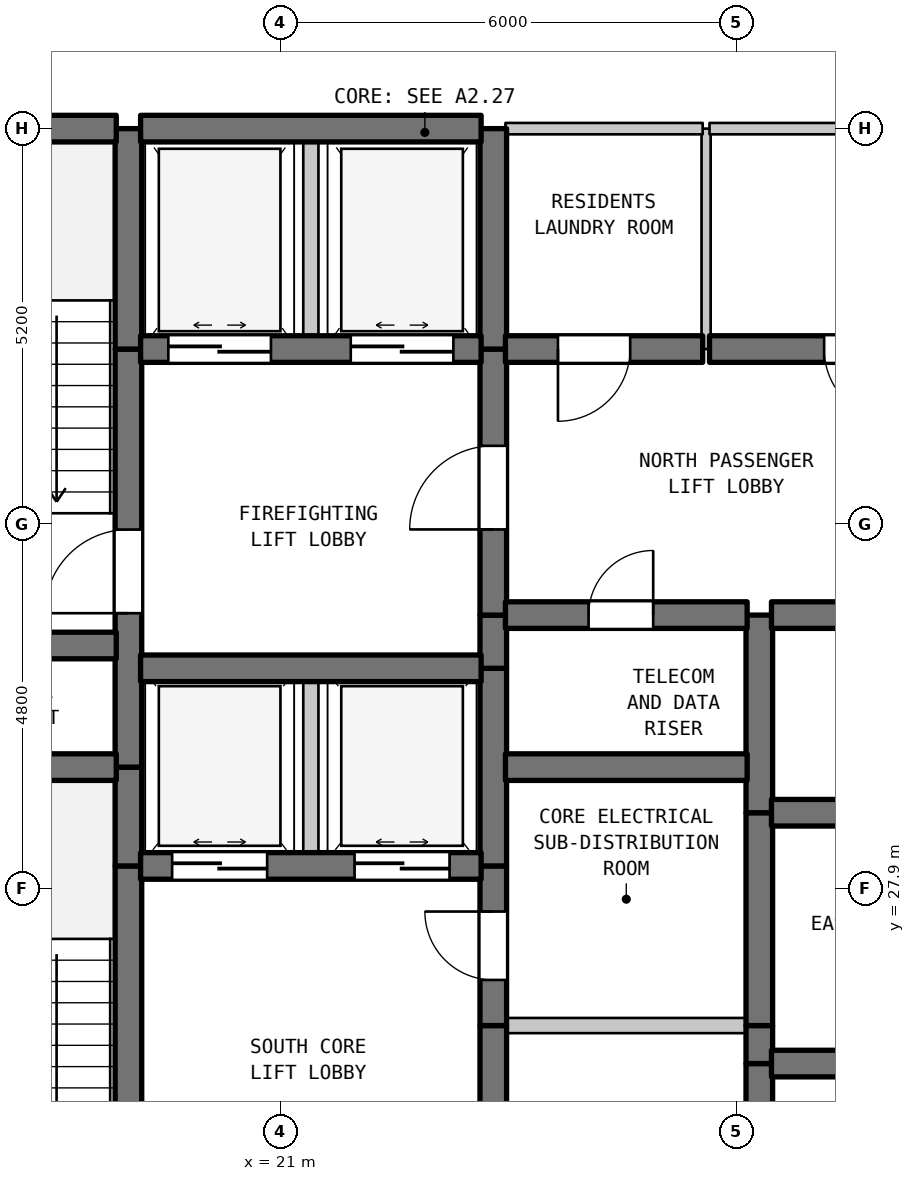
"""IFC4 building model, lengths in metres.
Left out: names, types, materials, properties, quantities, classifications, styles, units other than length and angle.
Written with IfcOpenShell. Run it as: python <this file> out.ifc"""

import sys

from ifc_helpers import new_model, si_unit, direction, frame, frame_2d, origin, place, context, subcontext, project, spatial, rectangle, extrude, element, fill, save


model = new_model("IFC4")
c1 = context("Model", 3, precision=1e-05, world=origin(), true_north=direction((0.0, 1.0)))
c2 = subcontext(c1, "Body", "Model", "MODEL_VIEW")
j1 = project(units=[si_unit("LENGTHUNIT", "METRE"), si_unit("PLANEANGLEUNIT", "RADIAN")], contexts=[c1])
p1 = place(None, origin())
s1 = spatial("IfcSite", under=j1, at=p1, CompositionType="ELEMENT")
p2 = place(p1, origin())
s2 = spatial("IfcBuilding", under=s1, at=p2, CompositionType="ELEMENT")
p3 = place(p2, frame((0.0, 0.0, 254.7)))
s3 = spatial("IfcBuildingStorey", under=s2, at=p3, CompositionType="ELEMENT", Elevation=254.7)
p4 = place(p3, frame((19.0, 22.7, 0.0), z_axis=(0.0, 0.0, 1.0), x_axis=(0.0, 1.0, 0.0)))
e1 = element("IfcWall", 1, at=p4, inside=s3, PredefinedType="SHEAR", context=c2, shape_type="SweptSolid", body=[
    extrude(rectangle(XDim=5.5, YDim=0.35, at=frame_2d((2.75, 0.0))), origin(), (0.0, 0.0, 1.0), 3.39),
])
p5 = place(p4, frame((0.631, 0.0, 0.0)))
e2 = element("IfcOpeningElement", 2, at=p5, cuts=e1, PredefinedType="OPENING", context=c2, shape_type="SweptSolid", body=[
    extrude(rectangle(XDim=1.1, YDim=2.15, at=frame_2d((0.55, 1.075))), frame((0.0, 0.185, 0.0), z_axis=(0.0, -1.0, 0.0), x_axis=(1.0, 0.0, 0.0)), (0.0, 0.0, 1.0), 0.37),
])
p6 = place(p3, frame((19.0, 28.2, 0.0), z_axis=(0.0, 0.0, 1.0), x_axis=(0.0, 1.0, 0.0)))
e3 = element("IfcWall", 3, at=p6, inside=s3, PredefinedType="SHEAR", context=c2, shape_type="SweptSolid", body=[
    extrude(rectangle(XDim=1.3, YDim=0.35, at=frame_2d((0.65, 0.0))), origin(), (0.0, 0.0, 1.0), 3.39),
])
p7 = place(p3, frame((19.0, 29.5, 0.0), z_axis=(0.0, 0.0, 1.0), x_axis=(0.0, 1.0, 0.0)))
e4 = element("IfcWall", 4, at=p7, inside=s3, PredefinedType="SHEAR", context=c2, shape_type="SweptSolid", body=[
    extrude(rectangle(XDim=5.5, YDim=0.35, at=frame_2d((2.75, 0.0))), origin(), (0.0, 0.0, 1.0), 3.39),
])
p8 = place(p7, frame((2.025, 0.0, 0.0)))
e5 = element("IfcOpeningElement", 5, at=p8, cuts=e4, PredefinedType="OPENING", context=c2, shape_type="SweptSolid", body=[
    extrude(rectangle(XDim=1.1, YDim=2.15, at=frame_2d((0.55, 1.075))), frame((0.0, 0.185, 0.0), z_axis=(0.0, -1.0, 0.0), x_axis=(1.0, 0.0, 0.0)), (0.0, 0.0, 1.0), 0.37),
])
p9 = place(p3, frame((19.0, 35.0, 0.0), z_axis=(0.0, 0.0, 1.0), x_axis=(0.0, 1.0, 0.0)))
e6 = element("IfcWall", 6, at=p9, inside=s3, PredefinedType="SHEAR", context=c2, shape_type="SweptSolid", body=[
    extrude(rectangle(XDim=2.9, YDim=0.35, at=frame_2d((1.45, 0.0))), origin(), (0.0, 0.0, 1.0), 3.39),
])
p10 = place(p3, frame((21.4, 28.2, 0.0), z_axis=(0.0, 0.0, 1.0), x_axis=(0.0, 1.0, 0.0)))
e7 = element("IfcWall", 7, at=p10, inside=s3, PredefinedType="STANDARD", context=c2, shape_type="SweptSolid", body=[
    extrude(rectangle(XDim=2.6, YDim=0.2, at=frame_2d((1.3, 0.0))), origin(), (0.0, 0.0, 1.0), 3.39),
])
p11 = place(p3, frame((21.4, 35.0, 0.0), z_axis=(0.0, 0.0, 1.0), x_axis=(0.0, 1.0, 0.0)))
e8 = element("IfcWall", 8, at=p11, inside=s3, PredefinedType="STANDARD", context=c2, shape_type="SweptSolid", body=[
    extrude(rectangle(XDim=2.9, YDim=0.2, at=frame_2d((1.45, 0.0))), origin(), (0.0, 0.0, 1.0), 3.39),
])
p12 = place(p3, frame((23.8, 19.5, 0.0), z_axis=(0.0, 0.0, 1.0), x_axis=(0.0, 1.0, 0.0)))
e9 = element("IfcWall", 9, at=p12, inside=s3, PredefinedType="SHEAR", context=c2, shape_type="SweptSolid", body=[
    extrude(rectangle(XDim=6.6, YDim=0.35, at=frame_2d((3.3, 0.0))), origin(), (0.0, 0.0, 1.0), 3.39),
])
p13 = place(p12, frame((4.304, 0.0, 0.0)))
e10 = element("IfcOpeningElement", 10, at=p13, cuts=e9, PredefinedType="OPENING", context=c2, shape_type="SweptSolid", body=[
    extrude(rectangle(XDim=0.9, YDim=2.15, at=frame_2d((0.45, 1.075))), frame((0.0, 0.185, 0.0), z_axis=(0.0, -1.0, 0.0), x_axis=(1.0, 0.0, 0.0)), (0.0, 0.0, 1.0), 0.37),
])
p14 = place(p3, frame((23.8, 26.1, 0.0), z_axis=(0.0, 0.0, 1.0), x_axis=(0.0, 1.0, 0.0)))
e11 = element("IfcWall", 11, at=p14, inside=s3, PredefinedType="SHEAR", context=c2, shape_type="SweptSolid", body=[
    extrude(rectangle(XDim=2.1, YDim=0.35, at=frame_2d((1.05, 0.0))), origin(), (0.0, 0.0, 1.0), 3.39),
])
p15 = place(p14, frame((0.6, 0.0, 0.0)))
e12 = element("IfcOpeningElement", 12, at=p15, cuts=e11, PredefinedType="OPENING", context=c2, shape_type="SweptSolid", body=[
    extrude(rectangle(XDim=0.9, YDim=2.15, at=frame_2d((0.45, 1.075))), frame((0.0, 0.185, 0.0), z_axis=(0.0, -1.0, 0.0), x_axis=(1.0, 0.0, 0.0)), (0.0, 0.0, 1.0), 0.37),
])
p16 = place(p3, frame((23.8, 28.2, 0.0), z_axis=(0.0, 0.0, 1.0), x_axis=(0.0, 1.0, 0.0)))
e13 = element("IfcWall", 13, at=p16, inside=s3, PredefinedType="SHEAR", context=c2, shape_type="SweptSolid", body=[
    extrude(rectangle(XDim=2.6, YDim=0.35, at=frame_2d((1.3, 0.0))), origin(), (0.0, 0.0, 1.0), 3.39),
])
p17 = place(p3, frame((23.8, 30.8, 0.0), z_axis=(0.0, 0.0, 1.0), x_axis=(0.0, 1.0, 0.0)))
e14 = element("IfcWall", 14, at=p17, inside=s3, PredefinedType="SHEAR", context=c2, shape_type="SweptSolid", body=[
    extrude(rectangle(XDim=0.7, YDim=0.35, at=frame_2d((0.35, 0.0))), origin(), (0.0, 0.0, 1.0), 3.39),
])
p18 = place(p3, frame((23.8, 31.5, 0.0), z_axis=(0.0, 0.0, 1.0), x_axis=(0.0, 1.0, 0.0)))
e15 = element("IfcWall", 15, at=p18, inside=s3, PredefinedType="SHEAR", context=c2, shape_type="SweptSolid", body=[
    extrude(rectangle(XDim=3.5, YDim=0.35, at=frame_2d((1.75, 0.0))), origin(), (0.0, 0.0, 1.0), 3.39),
])
p19 = place(p18, frame((1.127, 0.0, 0.0)))
e16 = element("IfcOpeningElement", 16, at=p19, cuts=e15, PredefinedType="OPENING", context=c2, shape_type="SweptSolid", body=[
    extrude(rectangle(XDim=1.1, YDim=2.15, at=frame_2d((0.55, 1.075))), frame((0.0, 0.185, 0.0), z_axis=(0.0, -1.0, 0.0), x_axis=(1.0, 0.0, 0.0)), (0.0, 0.0, 1.0), 0.37),
])
p20 = place(p3, frame((23.8, 35.0, 0.0), z_axis=(0.0, 0.0, 1.0), x_axis=(0.0, 1.0, 0.0)))
e17 = element("IfcWall", 17, at=p20, inside=s3, PredefinedType="SHEAR", context=c2, shape_type="SweptSolid", body=[
    extrude(rectangle(XDim=2.9, YDim=0.35, at=frame_2d((1.45, 0.0))), origin(), (0.0, 0.0, 1.0), 3.39),
])
p21 = place(p3, frame((26.6, 35.0, 0.0), z_axis=(0.0, 0.0, 1.0), x_axis=(0.0, 1.0, 0.0)))
e18 = element("IfcWall", 18, at=p21, inside=s3, PredefinedType="PARTITIONING", context=c2, shape_type="SweptSolid", body=[
    extrude(rectangle(XDim=2.9, YDim=0.12, at=frame_2d((1.45, 0.0))), origin(), (0.0, 0.0, 1.0), 3.39),
])
p22 = place(p3, frame((27.3, 22.7, 0.0), z_axis=(0.0, 0.0, 1.0), x_axis=(0.0, 1.0, 0.0)))
e19 = element("IfcWall", 19, at=p22, inside=s3, PredefinedType="SHEAR", context=c2, shape_type="SweptSolid", body=[
    extrude(rectangle(XDim=2.9, YDim=0.35, at=frame_2d((1.45, 0.0))), origin(), (0.0, 0.0, 1.0), 3.39),
])
p23 = place(p3, frame((27.3, 25.6, 0.0), z_axis=(0.0, 0.0, 1.0), x_axis=(0.0, 1.0, 0.0)))
e20 = element("IfcWall", 20, at=p23, inside=s3, PredefinedType="SHEAR", context=c2, shape_type="SweptSolid", body=[
    extrude(rectangle(XDim=0.5, YDim=0.35, at=frame_2d((0.25, 0.0))), origin(), (0.0, 0.0, 1.0), 3.39),
])
p24 = place(p3, frame((27.3, 26.1, 0.0), z_axis=(0.0, 0.0, 1.0), x_axis=(0.0, 1.0, 0.0)))
e21 = element("IfcWall", 21, at=p24, inside=s3, PredefinedType="SHEAR", context=c2, shape_type="SweptSolid", body=[
    extrude(rectangle(XDim=2.8, YDim=0.35, at=frame_2d((1.4, 0.0))), origin(), (0.0, 0.0, 1.0), 3.39),
])
p25 = place(p3, frame((27.3, 28.9, 0.0), z_axis=(0.0, 0.0, 1.0), x_axis=(0.0, 1.0, 0.0)))
e22 = element("IfcWall", 22, at=p25, inside=s3, PredefinedType="SHEAR", context=c2, shape_type="SweptSolid", body=[
    extrude(rectangle(XDim=2.6, YDim=0.35, at=frame_2d((1.3, 0.0))), origin(), (0.0, 0.0, 1.0), 3.39),
])
p26 = place(p3, frame((27.46, 25.6, 0.0), z_axis=(0.0, 0.0, 1.0), x_axis=(1.0, 0.0, 0.0)))
e23 = element("IfcWall", 23, at=p26, inside=s3, PredefinedType="SHEAR", context=c2, shape_type="SweptSolid", body=[
    extrude(rectangle(XDim=3.18, YDim=0.35, at=frame_2d((1.59, 0.0))), origin(), (0.0, 0.0, 1.0), 3.39),
])
p27 = place(p26, frame((1.115, 0.0, 0.0)))
e24 = element("IfcOpeningElement", 24, at=p27, cuts=e23, PredefinedType="OPENING", context=c2, shape_type="SweptSolid", body=[
    extrude(rectangle(XDim=0.95, YDim=2.15, at=frame_2d((0.475, 1.075))), frame((0.0, 0.185, 0.0), z_axis=(0.0, -1.0, 0.0), x_axis=(1.0, 0.0, 0.0)), (0.0, 0.0, 1.0), 0.37),
])
p28 = place(p3, frame((23.96, 26.1, 0.0), z_axis=(0.0, 0.0, 1.0), x_axis=(1.0, 0.0, 0.0)))
e25 = element("IfcWall", 25, at=p28, inside=s3, PredefinedType="STANDARD", context=c2, shape_type="SweptSolid", body=[
    extrude(rectangle(XDim=3.18, YDim=0.2, at=frame_2d((1.59, 0.0))), origin(), (0.0, 0.0, 1.0), 3.39),
])
p29 = place(p3, frame((19.16, 28.2, 0.0), z_axis=(0.0, 0.0, 1.0), x_axis=(1.0, 0.0, 0.0)))
e26 = element("IfcWall", 26, at=p29, inside=s3, PredefinedType="SHEAR", context=c2, shape_type="SweptSolid", body=[
    extrude(rectangle(XDim=4.48, YDim=0.35, at=frame_2d((2.24, 0.0))), origin(), (0.0, 0.0, 1.0), 3.39),
])
p30 = place(p29, frame((0.415, 0.0, 0.0)))
e27 = element("IfcOpeningElement", 27, at=p30, cuts=e26, PredefinedType="OPENING", context=c2, shape_type="SweptSolid", body=[
    extrude(rectangle(XDim=1.25, YDim=2.2, at=frame_2d((0.625, 1.1))), frame((0.0, 0.185, 0.0), z_axis=(0.0, -1.0, 0.0), x_axis=(1.0, 0.0, 0.0)), (0.0, 0.0, 1.0), 0.37),
])
p31 = place(p29, frame((2.815, 0.0, 0.0)))
e28 = element("IfcOpeningElement", 28, at=p31, cuts=e26, PredefinedType="OPENING", context=c2, shape_type="SweptSolid", body=[
    extrude(rectangle(XDim=1.25, YDim=2.2, at=frame_2d((0.625, 1.1))), frame((0.0, 0.185, 0.0), z_axis=(0.0, -1.0, 0.0), x_axis=(1.0, 0.0, 0.0)), (0.0, 0.0, 1.0), 0.37),
])
p32 = place(p3, frame((27.46, 28.9, 0.0), z_axis=(0.0, 0.0, 1.0), x_axis=(1.0, 0.0, 0.0)))
e29 = element("IfcWall", 29, at=p32, inside=s3, PredefinedType="SHEAR", context=c2, shape_type="SweptSolid", body=[
    extrude(rectangle(XDim=3.18, YDim=0.35, at=frame_2d((1.59, 0.0))), origin(), (0.0, 0.0, 1.0), 3.39),
])
p33 = place(p32, frame((1.115, 0.0, 0.0)))
e30 = element("IfcOpeningElement", 30, at=p33, cuts=e29, PredefinedType="OPENING", context=c2, shape_type="SweptSolid", body=[
    extrude(rectangle(XDim=0.95, YDim=2.15, at=frame_2d((0.475, 1.075))), frame((0.0, 0.185, 0.0), z_axis=(0.0, -1.0, 0.0), x_axis=(1.0, 0.0, 0.0)), (0.0, 0.0, 1.0), 0.37),
])
p34 = place(p3, frame((15.16, 29.5, 0.0), z_axis=(0.0, 0.0, 1.0), x_axis=(1.0, 0.0, 0.0)))
e31 = element("IfcWall", 31, at=p34, inside=s3, PredefinedType="SHEAR", context=c2, shape_type="SweptSolid", body=[
    extrude(rectangle(XDim=3.68, YDim=0.35, at=frame_2d((1.84, 0.0))), origin(), (0.0, 0.0, 1.0), 3.39),
])
p35 = place(p3, frame((23.96, 29.5, 0.0), z_axis=(0.0, 0.0, 1.0), x_axis=(1.0, 0.0, 0.0)))
e32 = element("IfcWall", 32, at=p35, inside=s3, PredefinedType="SHEAR", context=c2, shape_type="SweptSolid", body=[
    extrude(rectangle(XDim=3.18, YDim=0.35, at=frame_2d((1.59, 0.0))), origin(), (0.0, 0.0, 1.0), 3.39),
])
p36 = place(p3, frame((19.16, 30.8, 0.0), z_axis=(0.0, 0.0, 1.0), x_axis=(1.0, 0.0, 0.0)))
e33 = element("IfcWall", 33, at=p36, inside=s3, PredefinedType="SHEAR", context=c2, shape_type="SweptSolid", body=[
    extrude(rectangle(XDim=4.48, YDim=0.35, at=frame_2d((2.24, 0.0))), origin(), (0.0, 0.0, 1.0), 3.39),
])
p37 = place(p3, frame((15.16, 31.1, 0.0), z_axis=(0.0, 0.0, 1.0), x_axis=(1.0, 0.0, 0.0)))
e34 = element("IfcWall", 34, at=p37, inside=s3, PredefinedType="SHEAR", context=c2, shape_type="SweptSolid", body=[
    extrude(rectangle(XDim=3.68, YDim=0.35, at=frame_2d((1.84, 0.0))), origin(), (0.0, 0.0, 1.0), 3.39),
])
p38 = place(p3, frame((23.96, 31.5, 0.0), z_axis=(0.0, 0.0, 1.0), x_axis=(1.0, 0.0, 0.0)))
e35 = element("IfcWall", 35, at=p38, inside=s3, PredefinedType="SHEAR", context=c2, shape_type="SweptSolid", body=[
    extrude(rectangle(XDim=3.18, YDim=0.35, at=frame_2d((1.59, 0.0))), origin(), (0.0, 0.0, 1.0), 3.39),
])
p39 = place(p38, frame((1.094, 0.0, 0.0)))
e36 = element("IfcOpeningElement", 36, at=p39, cuts=e35, PredefinedType="OPENING", context=c2, shape_type="SweptSolid", body=[
    extrude(rectangle(XDim=0.85, YDim=2.1, at=frame_2d((0.425, 1.05))), frame((0.0, 0.185, 0.0), z_axis=(0.0, -1.0, 0.0), x_axis=(1.0, 0.0, 0.0)), (0.0, 0.0, 1.0), 0.37),
])
p40 = place(p3, frame((27.46, 31.5, 0.0), z_axis=(0.0, 0.0, 1.0), x_axis=(1.0, 0.0, 0.0)))
e37 = element("IfcWall", 37, at=p40, inside=s3, PredefinedType="SHEAR", context=c2, shape_type="SweptSolid", body=[
    extrude(rectangle(XDim=3.18, YDim=0.35, at=frame_2d((1.59, 0.0))), origin(), (0.0, 0.0, 1.0), 3.39),
])
p41 = place(p3, frame((19.16, 35.0, 0.0), z_axis=(0.0, 0.0, 1.0), x_axis=(1.0, 0.0, 0.0)))
e38 = element("IfcWall", 38, at=p41, inside=s3, PredefinedType="SHEAR", context=c2, shape_type="SweptSolid", body=[
    extrude(rectangle(XDim=4.48, YDim=0.35, at=frame_2d((2.24, 0.0))), origin(), (0.0, 0.0, 1.0), 3.39),
])
p42 = place(p41, frame((0.365, 0.0, 0.0)))
e39 = element("IfcOpeningElement", 39, at=p42, cuts=e38, PredefinedType="OPENING", context=c2, shape_type="SweptSolid", body=[
    extrude(rectangle(XDim=1.35, YDim=2.2, at=frame_2d((0.675, 1.1))), frame((0.0, 0.185, 0.0), z_axis=(0.0, -1.0, 0.0), x_axis=(1.0, 0.0, 0.0)), (0.0, 0.0, 1.0), 0.37),
])
p43 = place(p41, frame((2.765, 0.0, 0.0)))
e40 = element("IfcOpeningElement", 40, at=p43, cuts=e38, PredefinedType="OPENING", context=c2, shape_type="SweptSolid", body=[
    extrude(rectangle(XDim=1.35, YDim=2.2, at=frame_2d((0.675, 1.1))), frame((0.0, 0.185, 0.0), z_axis=(0.0, -1.0, 0.0), x_axis=(1.0, 0.0, 0.0)), (0.0, 0.0, 1.0), 0.37),
])
p44 = place(p3, frame((23.96, 35.0, 0.0), z_axis=(0.0, 0.0, 1.0), x_axis=(1.0, 0.0, 0.0)))
e41 = element("IfcWall", 41, at=p44, inside=s3, PredefinedType="SHEAR", context=c2, shape_type="SweptSolid", body=[
    extrude(rectangle(XDim=2.595, YDim=0.35, at=frame_2d((1.297, 0.0))), origin(), (0.0, 0.0, 1.0), 3.39),
])
p45 = place(p44, frame((0.691, 0.0, 0.0)))
e42 = element("IfcOpeningElement", 42, at=p45, cuts=e41, PredefinedType="OPENING", context=c2, shape_type="SweptSolid", body=[
    extrude(rectangle(XDim=0.95, YDim=2.15, at=frame_2d((0.475, 1.075))), frame((0.0, 0.185, 0.0), z_axis=(0.0, -1.0, 0.0), x_axis=(1.0, 0.0, 0.0)), (0.0, 0.0, 1.0), 0.37),
])
p46 = place(p3, frame((26.645, 35.0, 0.0), z_axis=(0.0, 0.0, 1.0), x_axis=(1.0, 0.0, 0.0)))
e43 = element("IfcWall", 43, at=p46, inside=s3, PredefinedType="SHEAR", context=c2, shape_type="SweptSolid", body=[
    extrude(rectangle(XDim=3.995, YDim=0.35, at=frame_2d((1.998, 0.0))), origin(), (0.0, 0.0, 1.0), 3.39),
])
p47 = place(p46, frame((1.508, 0.0, 0.0)))
e44 = element("IfcOpeningElement", 44, at=p47, cuts=e43, PredefinedType="OPENING", context=c2, shape_type="SweptSolid", body=[
    extrude(rectangle(XDim=0.95, YDim=2.15, at=frame_2d((0.475, 1.075))), frame((0.0, 0.185, 0.0), z_axis=(0.0, -1.0, 0.0), x_axis=(1.0, 0.0, 0.0)), (0.0, 0.0, 1.0), 0.37),
])
p48 = place(p3, frame((15.16, 37.9, 0.0), z_axis=(0.0, 0.0, 1.0), x_axis=(1.0, 0.0, 0.0)))
e45 = element("IfcWall", 45, at=p48, inside=s3, PredefinedType="SHEAR", context=c2, shape_type="SweptSolid", body=[
    extrude(rectangle(XDim=3.68, YDim=0.35, at=frame_2d((1.84, 0.0))), origin(), (0.0, 0.0, 1.0), 3.39),
])
p49 = place(p3, frame((19.16, 37.9, 0.0), z_axis=(0.0, 0.0, 1.0), x_axis=(1.0, 0.0, 0.0)))
e46 = element("IfcWall", 46, at=p49, inside=s3, PredefinedType="SHEAR", context=c2, shape_type="SweptSolid", body=[
    extrude(rectangle(XDim=4.48, YDim=0.35, at=frame_2d((2.24, 0.0))), origin(), (0.0, 0.0, 1.0), 3.39),
])
p50 = place(p3, frame((23.96, 37.9, 0.0), z_axis=(0.0, 0.0, 1.0), x_axis=(1.0, 0.0, 0.0)))
e47 = element("IfcWall", 47, at=p50, inside=s3, PredefinedType="STANDARD", context=c2, shape_type="SweptSolid", body=[
    extrude(rectangle(XDim=2.595, YDim=0.15, at=frame_2d((1.297, 0.0))), origin(), (0.0, 0.0, 1.0), 2.89),
])
p51 = place(p3, frame((26.645, 37.9, 0.0), z_axis=(0.0, 0.0, 1.0), x_axis=(1.0, 0.0, 0.0)))
e48 = element("IfcWall", 48, at=p51, inside=s3, PredefinedType="STANDARD", context=c2, shape_type="SweptSolid", body=[
    extrude(rectangle(XDim=4.095, YDim=0.15, at=frame_2d((2.047, 0.0))), origin(), (0.0, 0.0, 1.0), 2.89),
])
p52 = place(p8, origin())
e49 = element("IfcDoor", 49, at=p52, inside=s3, OperationType="SINGLE_SWING_LEFT", PredefinedType="DOOR", context=c2, shape_type="SweptSolid", body=[
    extrude(rectangle(XDim=1.1, YDim=2.15, at=frame_2d((0.55, 1.075))), frame((0.0, 0.025, 0.0), z_axis=(0.0, -1.0, 0.0), x_axis=(1.0, 0.0, 0.0)), (0.0, 0.0, 1.0), 0.05),
])
fill(e5, e49)
p53 = place(p15, origin())
e50 = element("IfcDoor", 50, at=p53, inside=s3, OperationType="SINGLE_SWING_RIGHT", PredefinedType="DOOR", context=c2, shape_type="SweptSolid", body=[
    extrude(rectangle(XDim=0.9, YDim=2.15, at=frame_2d((0.45, 1.075))), frame((0.0, 0.025, 0.0), z_axis=(0.0, -1.0, 0.0), x_axis=(1.0, 0.0, 0.0)), (0.0, 0.0, 1.0), 0.05),
])
fill(e12, e50)
p54 = place(p19, origin())
e51 = element("IfcDoor", 51, at=p54, inside=s3, OperationType="SINGLE_SWING_LEFT", PredefinedType="DOOR", context=c2, shape_type="SweptSolid", body=[
    extrude(rectangle(XDim=1.1, YDim=2.15, at=frame_2d((0.55, 1.075))), frame((0.0, 0.025, 0.0), z_axis=(0.0, -1.0, 0.0), x_axis=(1.0, 0.0, 0.0)), (0.0, 0.0, 1.0), 0.05),
])
fill(e16, e51)
p55 = place(p30, origin())
e52 = element("IfcDoor", 52, at=p55, inside=s3, OperationType="DOUBLE_DOOR_SLIDING", PredefinedType="DOOR", context=c2, shape_type="SweptSolid", body=[
    extrude(rectangle(XDim=1.25, YDim=2.2, at=frame_2d((0.625, 1.1))), frame((0.0, 0.025, 0.0), z_axis=(0.0, -1.0, 0.0), x_axis=(1.0, 0.0, 0.0)), (0.0, 0.0, 1.0), 0.05),
])
fill(e27, e52)
p56 = place(p31, origin())
e53 = element("IfcDoor", 53, at=p56, inside=s3, OperationType="DOUBLE_DOOR_SLIDING", PredefinedType="DOOR", context=c2, shape_type="SweptSolid", body=[
    extrude(rectangle(XDim=1.25, YDim=2.2, at=frame_2d((0.625, 1.1))), frame((0.0, 0.025, 0.0), z_axis=(0.0, -1.0, 0.0), x_axis=(1.0, 0.0, 0.0)), (0.0, 0.0, 1.0), 0.05),
])
fill(e28, e53)
p57 = place(p39, origin())
e54 = element("IfcDoor", 54, at=p57, inside=s3, OperationType="SINGLE_SWING_RIGHT", PredefinedType="DOOR", context=c2, shape_type="SweptSolid", body=[
    extrude(rectangle(XDim=0.85, YDim=2.1, at=frame_2d((0.425, 1.05))), frame((0.0, 0.025, 0.0), z_axis=(0.0, -1.0, 0.0), x_axis=(1.0, 0.0, 0.0)), (0.0, 0.0, 1.0), 0.05),
])
fill(e36, e54)
p58 = place(p42, origin())
e55 = element("IfcDoor", 55, at=p58, inside=s3, OperationType="DOUBLE_DOOR_SLIDING", PredefinedType="DOOR", context=c2, shape_type="SweptSolid", body=[
    extrude(rectangle(XDim=1.35, YDim=2.2, at=frame_2d((0.675, 1.1))), frame((0.0, 0.025, 0.0), z_axis=(0.0, -1.0, 0.0), x_axis=(1.0, 0.0, 0.0)), (0.0, 0.0, 1.0), 0.05),
])
fill(e39, e55)
p59 = place(p43, origin())
e56 = element("IfcDoor", 56, at=p59, inside=s3, OperationType="DOUBLE_DOOR_SLIDING", PredefinedType="DOOR", context=c2, shape_type="SweptSolid", body=[
    extrude(rectangle(XDim=1.35, YDim=2.2, at=frame_2d((0.675, 1.1))), frame((0.0, 0.025, 0.0), z_axis=(0.0, -1.0, 0.0), x_axis=(1.0, 0.0, 0.0)), (0.0, 0.0, 1.0), 0.05),
])
fill(e40, e56)
p60 = place(p45, frame((0.95, 0.0, 0.0), z_axis=(0.0, 0.0, 1.0), x_axis=(-1.0, 0.0, 0.0)))
e57 = element("IfcDoor", 57, at=p60, inside=s3, OperationType="SINGLE_SWING_LEFT", PredefinedType="DOOR", context=c2, shape_type="SweptSolid", body=[
    extrude(rectangle(XDim=0.95, YDim=2.15, at=frame_2d((0.475, 1.075))), frame((0.0, 0.025, 0.0), z_axis=(0.0, -1.0, 0.0), x_axis=(1.0, 0.0, 0.0)), (0.0, 0.0, 1.0), 0.05),
])
fill(e42, e57)
p61 = place(p47, frame((0.95, 0.0, 0.0), z_axis=(0.0, 0.0, 1.0), x_axis=(-1.0, 0.0, 0.0)))
e58 = element("IfcDoor", 58, at=p61, inside=s3, OperationType="SINGLE_SWING_RIGHT", PredefinedType="DOOR", context=c2, shape_type="SweptSolid", body=[
    extrude(rectangle(XDim=0.95, YDim=2.15, at=frame_2d((0.475, 1.075))), frame((0.0, 0.025, 0.0), z_axis=(0.0, -1.0, 0.0), x_axis=(1.0, 0.0, 0.0)), (0.0, 0.0, 1.0), 0.05),
])
fill(e44, e58)
save(model, sys.argv[1])
